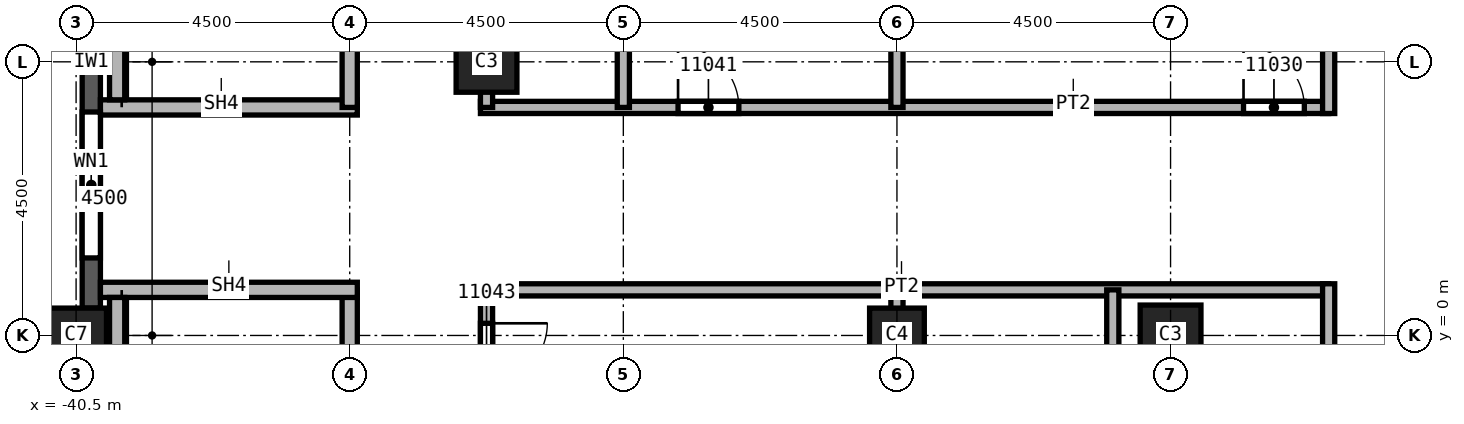
"""IFC4 building model, lengths in metres.
Left out: names, types, materials, properties, quantities, classifications, styles, units other than length and angle.
Written with IfcOpenShell. Run it as: python <this file> out.ifc"""

import sys

from ifc_helpers import new_model, si_unit, direction, frame, frame_2d, origin, origin_2d, place, context, subcontext, project, spatial, rectangle, extrude, element, fill, save


model = new_model("IFC4")
c1 = context("Model", 3, precision=1e-05, world=origin(), true_north=direction((0.0, 1.0)))
c2 = subcontext(c1, "Body", "Model", "MODEL_VIEW")
j1 = project(units=[si_unit("LENGTHUNIT", "METRE"), si_unit("PLANEANGLEUNIT", "RADIAN")], contexts=[c1])
p1 = place(None, origin())
s1 = spatial("IfcSite", under=j1, at=p1, CompositionType="ELEMENT")
p2 = place(p1, origin())
s2 = spatial("IfcBuilding", under=s1, at=p2, CompositionType="ELEMENT")
p3 = place(p2, frame((0.0, 0.0, 184.0)))
s3 = spatial("IfcBuildingStorey", under=s2, at=p3, CompositionType="ELEMENT", Elevation=184.0)
p4 = place(p3, frame((-40.5, 0.0, 0.0), z_axis=(0.0, 0.0, 1.0), x_axis=(0.0, 1.0, 0.0)))
e1 = element("IfcColumn", 1, at=p4, inside=s3, PredefinedType="COLUMN", context=c2, shape_type="SweptSolid", body=[
    extrude(rectangle(XDim=0.9, YDim=1.0, at=origin_2d()), origin(), (0.0, 0.0, 1.0), 3.72),
])
for number, where, z_axis, x_axis in (
    (2, (-33.75, 4.5, 0.0), (0.0, 0.0, 1.0), (1.0, 0.0, 0.0)),
    (3, (-22.5, 0.0, 0.0), (0.0, 0.0, 1.0), (1.0, 0.0, 0.0)),
):
    element("IfcColumn", number, at=place(p3, frame(where, z_axis=z_axis, x_axis=x_axis)), inside=s3, PredefinedType="COLUMN", context=c2, shape_type="SweptSolid", body=[
        extrude(rectangle(XDim=1.0, YDim=1.0, at=origin_2d()), origin(), (0.0, 0.0, 1.0), 3.72),
    ])
p5 = place(p3, frame((-27.0, 0.0, 0.0), z_axis=(0.0, 0.0, 1.0), x_axis=(1.0, 0.0, 0.0)))
e4 = element("IfcColumn", 4, at=p5, inside=s3, PredefinedType="COLUMN", context=c2, shape_type="SweptSolid", body=[
    extrude(rectangle(XDim=0.9, YDim=0.9, at=origin_2d()), origin(), (0.0, 0.0, 1.0), 3.72),
])
p6 = place(p3, frame((-40.25, 8.55, 0.0), z_axis=(0.0, 0.0, 1.0), x_axis=(0.0, -1.0, 0.0)))
e5 = element("IfcWall", 5, at=p6, inside=s3, PredefinedType="SOLIDWALL", context=c2, shape_type="SweptSolid", body=[
    extrude(rectangle(XDim=8.1, YDim=0.3, at=frame_2d((4.05, 0.0))), origin(), (0.0, 0.0, 1.0), 3.12),
])
p7 = place(p6, frame((0.825, 0.0, 0.8)))
e6 = element("IfcOpeningElement", 6, at=p7, cuts=e5, PredefinedType="OPENING", context=c2, shape_type="SweptSolid", body=[
    extrude(rectangle(XDim=2.4, YDim=1.95, at=frame_2d((1.2, 0.975))), frame((0.0, 0.15, 0.0), z_axis=(0.0, -1.0, 0.0), x_axis=(1.0, 0.0, 0.0)), (0.0, 0.0, 1.0), 0.3),
])
p8 = place(p6, frame((4.875, 0.0, 0.8)))
e7 = element("IfcOpeningElement", 7, at=p8, cuts=e5, PredefinedType="OPENING", context=c2, shape_type="SweptSolid", body=[
    extrude(rectangle(XDim=2.4, YDim=1.95, at=frame_2d((1.2, 0.975))), frame((0.0, 0.15, 0.0), z_axis=(0.0, -1.0, 0.0), x_axis=(1.0, 0.0, 0.0)), (0.0, 0.0, 1.0), 0.3),
])
p9 = place(p3, frame((-33.85, 3.75, 0.0), z_axis=(0.0, 0.0, 1.0), x_axis=(1.0, 0.0, 0.0)))
e8 = element("IfcWall", 8, at=p9, inside=s3, PredefinedType="PARTITIONING", context=c2, shape_type="SweptSolid", body=[
    extrude(rectangle(XDim=13.95, YDim=0.2, at=frame_2d((6.975, 0.0))), origin(), (0.0, 0.0, 1.0), 3.72),
])
p10 = place(p9, frame((12.55, 0.0, 0.0)))
e9 = element("IfcOpeningElement", 9, at=p10, cuts=e8, PredefinedType="OPENING", context=c2, shape_type="SweptSolid", body=[
    extrude(rectangle(XDim=1.0, YDim=2.1, at=frame_2d((0.5, 1.05))), frame((0.0, 0.1, 0.0), z_axis=(0.0, -1.0, 0.0), x_axis=(1.0, 0.0, 0.0)), (0.0, 0.0, 1.0), 0.2),
])
p11 = place(p9, frame((3.25, 0.0, 0.0)))
e10 = element("IfcOpeningElement", 10, at=p11, cuts=e8, PredefinedType="OPENING", context=c2, shape_type="SweptSolid", body=[
    extrude(rectangle(XDim=1.0, YDim=2.1, at=frame_2d((0.5, 1.05))), frame((0.0, 0.1, 0.0), z_axis=(0.0, -1.0, 0.0), x_axis=(1.0, 0.0, 0.0)), (0.0, 0.0, 1.0), 0.2),
])
p12 = place(p3, frame((-33.75, 0.75, 0.0), z_axis=(0.0, 0.0, 1.0), x_axis=(0.0, -1.0, 0.0)))
e11 = element("IfcWall", 11, at=p12, inside=s3, PredefinedType="PARTITIONING", context=c2, shape_type="SweptSolid", body=[
    extrude(rectangle(XDim=18.35, YDim=0.2, at=frame_2d((9.175, 0.0))), origin(), (0.0, 0.0, 1.0), 3.72),
])
p13 = place(p12, frame((0.55, 0.0, 0.0)))
e12 = element("IfcOpeningElement", 12, at=p13, cuts=e11, PredefinedType="OPENING", context=c2, shape_type="SweptSolid", body=[
    extrude(rectangle(XDim=1.0, YDim=2.1, at=frame_2d((0.5, 1.05))), frame((0.0, 0.1, 0.0), z_axis=(0.0, -1.0, 0.0), x_axis=(1.0, 0.0, 0.0)), (0.0, 0.0, 1.0), 0.2),
])
p14 = place(p3, frame((-33.75, 11.25, 0.0), z_axis=(0.0, 0.0, 1.0), x_axis=(0.0, -1.0, 0.0)))
e13 = element("IfcWall", 13, at=p14, inside=s3, PredefinedType="PARTITIONING", context=c2, shape_type="SweptSolid", body=[
    extrude(rectangle(XDim=7.5, YDim=0.2, at=frame_2d((3.75, 0.0))), origin(), (0.0, 0.0, 1.0), 3.72),
])
p15 = place(p14, frame((3.25, 0.0, 0.0)))
e14 = element("IfcOpeningElement", 14, at=p15, cuts=e13, PredefinedType="OPENING", context=c2, shape_type="SweptSolid", body=[
    extrude(rectangle(XDim=1.0, YDim=2.1, at=frame_2d((0.5, 1.05))), frame((0.0, 0.1, 0.0), z_axis=(0.0, -1.0, 0.0), x_axis=(1.0, 0.0, 0.0)), (0.0, 0.0, 1.0), 0.2),
])
p16 = place(p3, frame((-31.5, 17.5, 0.0), z_axis=(0.0, 0.0, 1.0), x_axis=(0.0, -1.0, 0.0)))
e15 = element("IfcWall", 15, at=p16, inside=s3, PredefinedType="PARTITIONING", context=c2, shape_type="SweptSolid", body=[
    extrude(rectangle(XDim=13.75, YDim=0.2, at=frame_2d((6.875, 0.0))), origin(), (0.0, 0.0, 1.0), 3.72),
])
p17 = place(p3, frame((-27.0, -6.75, 0.0), z_axis=(0.0, 0.0, 1.0), x_axis=(0.0, 1.0, 0.0)))
e16 = element("IfcWall", 16, at=p17, inside=s3, PredefinedType="PARTITIONING", context=c2, shape_type="SweptSolid", body=[
    extrude(rectangle(XDim=7.5, YDim=0.2, at=frame_2d((3.75, 0.0))), origin(), (0.0, 0.0, 1.0), 3.72),
])
p18 = place(p3, frame((-27.0, 3.75, 0.0), z_axis=(0.0, 0.0, 1.0), x_axis=(0.0, 1.0, 0.0)))
e17 = element("IfcWall", 17, at=p18, inside=s3, PredefinedType="PARTITIONING", context=c2, shape_type="SweptSolid", body=[
    extrude(rectangle(XDim=13.75, YDim=0.2, at=frame_2d((6.875, 0.0))), origin(), (0.0, 0.0, 1.0), 3.72),
])
p19 = place(p3, frame((-19.9, 0.75, 0.0), z_axis=(0.0, 0.0, 1.0), x_axis=(-1.0, 0.0, 0.0)))
e18 = element("IfcWall", 18, at=p19, inside=s3, PredefinedType="PARTITIONING", context=c2, shape_type="SweptSolid", body=[
    extrude(rectangle(XDim=13.95, YDim=0.2, at=frame_2d((6.975, 0.0))), origin(), (0.0, 0.0, 1.0), 3.72),
])
p20 = place(p3, frame((-23.45, -6.75, 0.0), z_axis=(0.0, 0.0, 1.0), x_axis=(0.0, 1.0, 0.0)))
e19 = element("IfcWall", 19, at=p20, inside=s3, PredefinedType="PARTITIONING", context=c2, shape_type="SweptSolid", body=[
    extrude(rectangle(XDim=7.5, YDim=0.2, at=frame_2d((3.75, 0.0))), origin(), (0.0, 0.0, 1.0), 3.72),
])
p21 = place(p20, frame((1.45, 0.0, 0.0)))
e20 = element("IfcOpeningElement", 20, at=p21, cuts=e19, PredefinedType="OPENING", context=c2, shape_type="SweptSolid", body=[
    extrude(rectangle(XDim=1.0, YDim=2.1, at=frame_2d((0.5, 1.05))), frame((0.0, 0.1, 0.0), z_axis=(0.0, -1.0, 0.0), x_axis=(1.0, 0.0, 0.0)), (0.0, 0.0, 1.0), 0.2),
])
p22 = place(p3, frame((-19.9, -22.4, 0.0), z_axis=(0.0, 0.0, 1.0), x_axis=(0.0, 1.0, 0.0)))
e21 = element("IfcWall", 21, at=p22, inside=s3, PredefinedType="PARTITIONING", context=c2, shape_type="SweptSolid", body=[
    extrude(rectangle(XDim=23.25, YDim=0.2, at=frame_2d((11.625, 0.0))), origin(), (0.0, 0.0, 1.0), 3.72),
])
p23 = place(p22, frame((3.7, 0.0, 0.0)))
e22 = element("IfcOpeningElement", 22, at=p23, cuts=e21, PredefinedType="OPENING", context=c2, shape_type="SweptSolid", body=[
    extrude(rectangle(XDim=1.0, YDim=2.1, at=frame_2d((0.5, 1.05))), frame((0.0, 0.1, 0.0), z_axis=(0.0, -1.0, 0.0), x_axis=(1.0, 0.0, 0.0)), (0.0, 0.0, 1.0), 0.2),
])
p24 = place(p22, frame((10.55, 0.0, 0.0)))
e23 = element("IfcOpeningElement", 23, at=p24, cuts=e21, PredefinedType="OPENING", context=c2, shape_type="SweptSolid", body=[
    extrude(rectangle(XDim=1.0, YDim=2.1, at=frame_2d((0.5, 1.05))), frame((0.0, 0.1, 0.0), z_axis=(0.0, -1.0, 0.0), x_axis=(1.0, 0.0, 0.0)), (0.0, 0.0, 1.0), 0.2),
])
p25 = place(p22, frame((18.05, 0.0, 0.0)))
e24 = element("IfcOpeningElement", 24, at=p25, cuts=e21, PredefinedType="OPENING", context=c2, shape_type="SweptSolid", body=[
    extrude(rectangle(XDim=1.0, YDim=2.1, at=frame_2d((0.5, 1.05))), frame((0.0, 0.1, 0.0), z_axis=(0.0, -1.0, 0.0), x_axis=(1.0, 0.0, 0.0)), (0.0, 0.0, 1.0), 0.2),
])
p26 = place(p3, frame((-19.9, 3.65, 0.0), z_axis=(0.0, 0.0, 1.0), x_axis=(0.0, 1.0, 0.0)))
e25 = element("IfcWall", 25, at=p26, inside=s3, PredefinedType="PARTITIONING", context=c2, shape_type="SweptSolid", body=[
    extrude(rectangle(XDim=9.95, YDim=0.2, at=frame_2d((4.975, 0.0))), origin(), (0.0, 0.0, 1.0), 3.72),
])
p27 = place(p26, frame((8.65, 0.0, 0.0)))
e26 = element("IfcOpeningElement", 26, at=p27, cuts=e25, PredefinedType="OPENING", context=c2, shape_type="SweptSolid", body=[
    extrude(rectangle(XDim=1.0, YDim=2.1, at=frame_2d((0.5, 1.05))), frame((0.0, 0.1, 0.0), z_axis=(0.0, -1.0, 0.0), x_axis=(1.0, 0.0, 0.0)), (0.0, 0.0, 1.0), 0.2),
])
p28 = place(p3, frame((-40.1, 3.75, 0.0), z_axis=(0.0, 0.0, 1.0), x_axis=(1.0, 0.0, 0.0)))
e27 = element("IfcWall", 27, at=p28, inside=s3, PredefinedType="SOLIDWALL", context=c2, shape_type="SweptSolid", body=[
    extrude(rectangle(XDim=4.225, YDim=0.25, at=frame_2d((2.113, 0.0))), origin(), (0.0, 0.0, 1.0), 3.72),
])
p29 = place(p3, frame((-36.0, 0.75, 0.0), z_axis=(0.0, 0.0, 1.0), x_axis=(0.0, -1.0, 0.0)))
e28 = element("IfcWall", 28, at=p29, inside=s3, PredefinedType="SOLIDWALL", context=c2, shape_type="SweptSolid", body=[
    extrude(rectangle(XDim=7.625, YDim=0.25, at=frame_2d((3.812, 0.0))), origin(), (0.0, 0.0, 1.0), 3.72),
])
p30 = place(p29, frame((5.95, 0.0, 0.0)))
e29 = element("IfcOpeningElement", 29, at=p30, cuts=e28, PredefinedType="OPENING", context=c2, shape_type="SweptSolid", body=[
    extrude(rectangle(XDim=1.2, YDim=2.1, at=frame_2d((0.6, 1.05))), frame((0.0, 0.125, 0.0), z_axis=(0.0, -1.0, 0.0), x_axis=(1.0, 0.0, 0.0)), (0.0, 0.0, 1.0), 0.25),
])
p31 = place(p3, frame((-36.0, 11.375, 0.0), z_axis=(0.0, 0.0, 1.0), x_axis=(0.0, -1.0, 0.0)))
e30 = element("IfcWall", 30, at=p31, inside=s3, PredefinedType="SOLIDWALL", context=c2, shape_type="SweptSolid", body=[
    extrude(rectangle(XDim=7.625, YDim=0.25, at=frame_2d((3.812, 0.0))), origin(), (0.0, 0.0, 1.0), 3.72),
])
p32 = place(p31, frame((0.4, 0.0, 0.0)))
e31 = element("IfcOpeningElement", 31, at=p32, cuts=e30, PredefinedType="OPENING", context=c2, shape_type="SweptSolid", body=[
    extrude(rectangle(XDim=1.2, YDim=2.1, at=frame_2d((0.6, 1.05))), frame((0.0, 0.125, 0.0), z_axis=(0.0, -1.0, 0.0), x_axis=(1.0, 0.0, 0.0)), (0.0, 0.0, 1.0), 0.25),
])
p33 = place(p3, frame((-35.875, 0.75, 0.0), z_axis=(0.0, 0.0, 1.0), x_axis=(-1.0, 0.0, 0.0)))
e32 = element("IfcWall", 32, at=p33, inside=s3, PredefinedType="SOLIDWALL", context=c2, shape_type="SweptSolid", body=[
    extrude(rectangle(XDim=4.225, YDim=0.25, at=frame_2d((2.113, 0.0))), origin(), (0.0, 0.0, 1.0), 3.72),
])
for number, where, z_axis, x_axis in (
    (33, (-39.825, 3.875, 0.0), (0.0, 0.0, 1.0), (0.0, 1.0, 0.0)),
    (34, (-39.825, -6.625, 0.0), (0.0, 0.0, 1.0), (0.0, 1.0, 0.0)),
):
    element("IfcWall", number, at=place(p3, frame(where, z_axis=z_axis, x_axis=x_axis)), inside=s3, PredefinedType="SOLIDWALL", context=c2, shape_type="SweptSolid", body=[
        extrude(rectangle(XDim=7.25, YDim=0.25, at=frame_2d((3.625, 0.0))), origin(), (0.0, 0.0, 1.0), 3.72),
    ])
p34 = place(p8, origin())
e35 = element("IfcWindow", 35, at=p34, inside=s3, PartitioningType="SINGLE_PANEL", PredefinedType="WINDOW", context=c2, shape_type="SweptSolid", body=[
    extrude(rectangle(XDim=2.4, YDim=1.95, at=frame_2d((1.2, 0.975))), frame((0.0, 0.03, 0.0), z_axis=(0.0, -1.0, 0.0), x_axis=(1.0, 0.0, 0.0)), (0.0, 0.0, 1.0), 0.06),
])
fill(e7, e35)
p35 = place(p10, origin())
e36 = element("IfcDoor", 36, at=p35, inside=s3, OperationType="SINGLE_SWING_LEFT", PredefinedType="DOOR", context=c2, shape_type="SweptSolid", body=[
    extrude(rectangle(XDim=1.0, YDim=2.1, at=frame_2d((0.5, 1.05))), frame((0.0, 0.025, 0.0), z_axis=(0.0, -1.0, 0.0), x_axis=(1.0, 0.0, 0.0)), (0.0, 0.0, 1.0), 0.05),
])
fill(e9, e36)
p36 = place(p11, origin())
e37 = element("IfcDoor", 37, at=p36, inside=s3, OperationType="SINGLE_SWING_RIGHT", PredefinedType="DOOR", context=c2, shape_type="SweptSolid", body=[
    extrude(rectangle(XDim=1.0, YDim=2.1, at=frame_2d((0.5, 1.05))), frame((0.0, 0.025, 0.0), z_axis=(0.0, -1.0, 0.0), x_axis=(1.0, 0.0, 0.0)), (0.0, 0.0, 1.0), 0.05),
])
fill(e10, e37)
p37 = place(p13, origin())
e38 = element("IfcDoor", 38, at=p37, inside=s3, OperationType="SINGLE_SWING_RIGHT", PredefinedType="DOOR", context=c2, shape_type="SweptSolid", body=[
    extrude(rectangle(XDim=1.0, YDim=2.1, at=frame_2d((0.5, 1.05))), frame((0.0, 0.025, 0.0), z_axis=(0.0, -1.0, 0.0), x_axis=(1.0, 0.0, 0.0)), (0.0, 0.0, 1.0), 0.05),
])
fill(e12, e38)
save(model, sys.argv[1])
